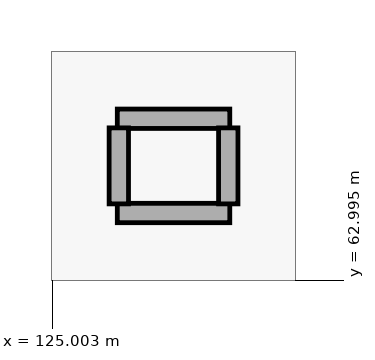
"""IFC4 building model, lengths in metres.
Left out: names, types, materials, properties, quantities, classifications, styles, units other than length and angle.
Written with IfcOpenShell. Run it as: python <this file> out.ifc"""

import sys

from ifc_helpers import new_model, si_unit, direction, frame, frame_2d, origin, place, context, subcontext, project, spatial, rectangle, extrude, element, save


model = new_model("IFC4")
c1 = context("Model", 3, precision=1e-05, world=origin(), true_north=direction((0.0, 1.0)))
c2 = subcontext(c1, "Body", "Model", "MODEL_VIEW")
j1 = project(units=[si_unit("LENGTHUNIT", "METRE"), si_unit("PLANEANGLEUNIT", "RADIAN")], contexts=[c1])
p1 = place(None, origin())
s1 = spatial("IfcSite", under=j1, at=p1, CompositionType="ELEMENT")
p2 = place(p1, origin())
s2 = spatial("IfcBuilding", under=s1, at=p2, CompositionType="ELEMENT")
p3 = place(p2, frame((0.0, 0.0, 15.6)))
s3 = spatial("IfcBuildingStorey", under=s2, at=p3, CompositionType="ELEMENT", Elevation=15.6)
for number, where, z_axis, x_axis in (
    (1, (125.86, 65.12, 0.0), (0.0, 0.0, 1.0), (1.0, 0.0, 0.0)),
    (2, (125.86, 63.88, 0.0), (0.0, 0.0, 1.0), (1.0, 0.0, 0.0)),
):
    element("IfcWall", number, at=place(p3, frame(where, z_axis=z_axis, x_axis=x_axis)), inside=s3, PredefinedType="PARTITIONING", context=c2, shape_type="SweptSolid", body=[
        extrude(rectangle(XDim=1.48, YDim=0.255, at=frame_2d((0.74, 0.0))), origin(), (0.0, 0.0, 1.0), 4.72),
    ])
for number, where, z_axis, x_axis in (
    (3, (125.88, 64.0, 0.0), (0.0, 0.0, 1.0), (0.0, 1.0, 0.0)),
    (4, (127.32, 64.0, 0.0), (0.0, 0.0, 1.0), (0.0, 1.0, 0.0)),
):
    element("IfcWall", number, at=place(p3, frame(where, z_axis=z_axis, x_axis=x_axis)), inside=s3, PredefinedType="PARTITIONING", context=c2, shape_type="SweptSolid", body=[
        extrude(rectangle(XDim=1.0, YDim=0.255, at=frame_2d((0.5, 0.0))), origin(), (0.0, 0.0, 1.0), 4.72),
    ])
save(model, sys.argv[1])
